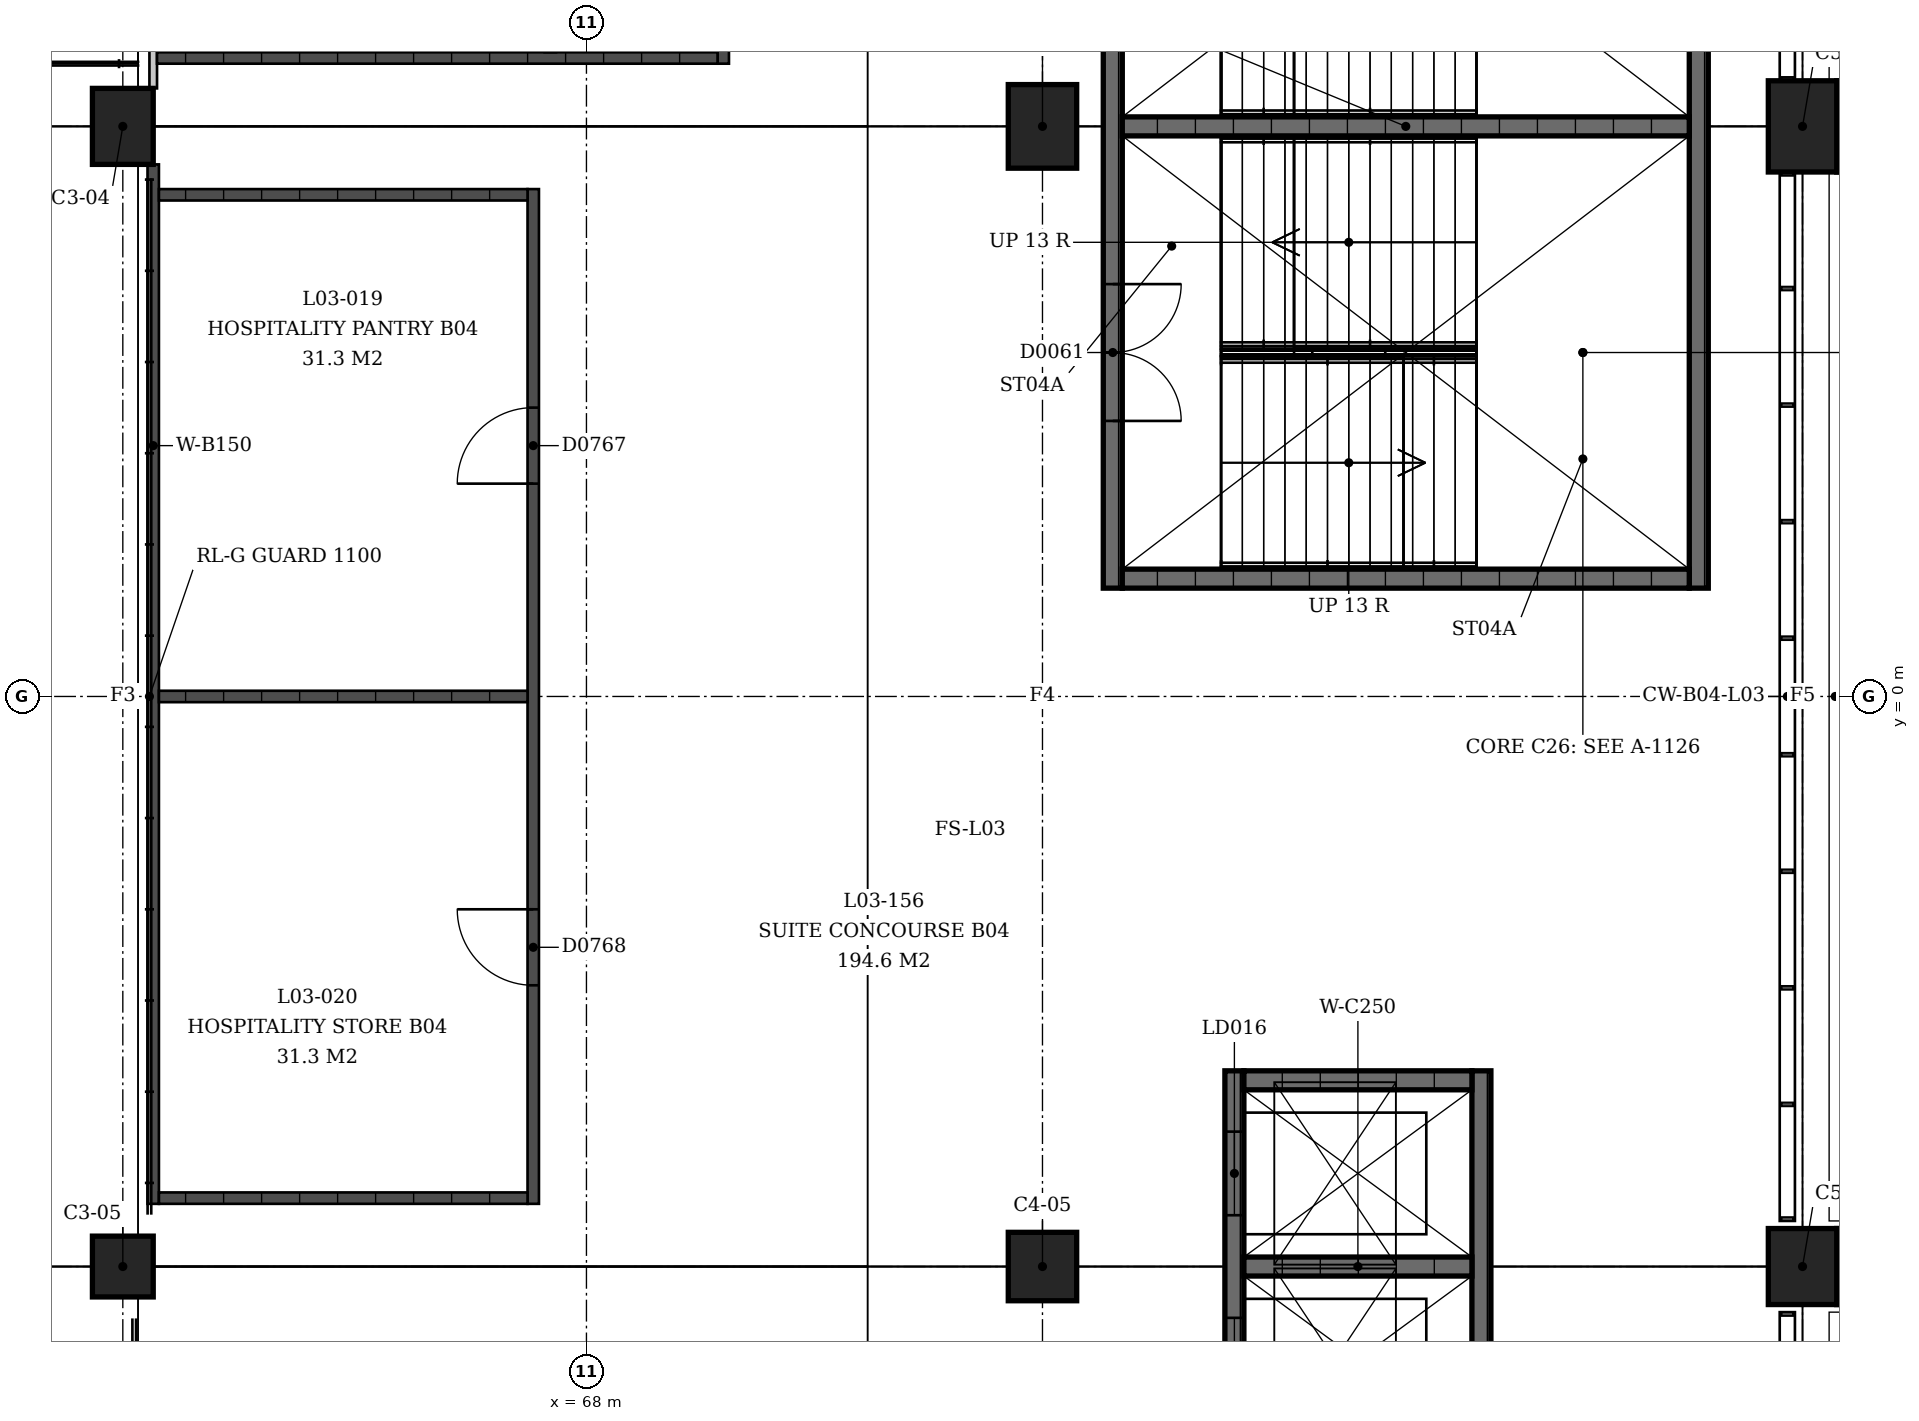
"""IFC4 building model, lengths in metres.
Left out: names, types, materials, properties, quantities, classifications, styles, units other than length and angle.
Written with IfcOpenShell. Run it as: python <this file> out.ifc"""

import sys

from ifc_helpers import new_model, si_unit, direction, frame, frame_2d, origin, origin_2d, place, context, subcontext, project, spatial, rectangle, extrude, element, fill, save


model = new_model("IFC4")
c1 = context("Model", 3, precision=1e-05, world=origin(), true_north=direction((0.0, 1.0)))
c2 = subcontext(c1, "Body", "Model", "MODEL_VIEW")
j1 = project(units=[si_unit("LENGTHUNIT", "METRE"), si_unit("PLANEANGLEUNIT", "RADIAN")], contexts=[c1])
p1 = place(None, origin())
s1 = spatial("IfcSite", under=j1, at=p1, CompositionType="ELEMENT")
p2 = place(p1, origin())
s2 = spatial("IfcBuilding", under=s1, at=p2, CompositionType="ELEMENT")
p3 = place(p2, frame((0.0, 0.0, 13.5)))
s3 = spatial("IfcBuildingStorey", under=s2, at=p3, CompositionType="ELEMENT", Elevation=13.5)
p4 = place(p3, frame((61.9, 7.5, 0.0), z_axis=(0.0, 0.0, 1.0), x_axis=(0.0, 1.0, 0.0)))
e1 = element("IfcColumn", 1, at=p4, inside=s3, PredefinedType="COLUMN", context=c2, shape_type="SweptSolid", body=[
    extrude(rectangle(XDim=1.0, YDim=0.8, at=origin_2d()), origin(), (0.0, 0.0, 1.0), 2.033),
])
p5 = place(p3, frame((74.0, 7.5, 0.0), z_axis=(0.0, 0.0, 1.0), x_axis=(0.0, 1.0, 0.0)))
e2 = element("IfcColumn", 2, at=p5, inside=s3, PredefinedType="COLUMN", context=c2, shape_type="SweptSolid", body=[
    extrude(rectangle(XDim=1.1, YDim=0.9, at=origin_2d()), origin(), (0.0, 0.0, 1.0), 4.5),
])
p6 = place(p3, frame((84.0, 7.5, 0.0), z_axis=(0.0, 0.0, 1.0), x_axis=(0.0, 1.0, 0.0)))
e3 = element("IfcColumn", 3, at=p6, inside=s3, PredefinedType="COLUMN", context=c2, shape_type="SweptSolid", body=[
    extrude(rectangle(XDim=1.2, YDim=0.9, at=origin_2d()), origin(), (0.0, 0.0, 1.0), 4.5),
])
p7 = place(p3, frame((61.9, -7.5, 0.0), z_axis=(0.0, 0.0, 1.0), x_axis=(0.0, 1.0, 0.0)))
e4 = element("IfcColumn", 4, at=p7, inside=s3, PredefinedType="COLUMN", context=c2, shape_type="SweptSolid", body=[
    extrude(rectangle(XDim=0.8, YDim=0.8, at=origin_2d()), origin(), (0.0, 0.0, 1.0), 2.033),
])
p8 = place(p3, frame((74.0, -7.5, 0.0), z_axis=(0.0, 0.0, 1.0), x_axis=(0.0, 1.0, 0.0)))
e5 = element("IfcColumn", 5, at=p8, inside=s3, PredefinedType="COLUMN", context=c2, shape_type="SweptSolid", body=[
    extrude(rectangle(XDim=0.9, YDim=0.9, at=origin_2d()), origin(), (0.0, 0.0, 1.0), 4.5),
])
p9 = place(p3, frame((84.0, -7.5, 0.0), z_axis=(0.0, 0.0, 1.0), x_axis=(0.0, 1.0, 0.0)))
e6 = element("IfcColumn", 6, at=p9, inside=s3, PredefinedType="COLUMN", context=c2, shape_type="SweptSolid", body=[
    extrude(rectangle(XDim=1.0, YDim=0.9, at=origin_2d()), origin(), (0.0, 0.0, 1.0), 4.5),
])
p10 = place(p3, frame((74.925, 1.425, 0.0), z_axis=(0.0, 0.0, 1.0), x_axis=(0.0, 1.0, 0.0)))
e7 = element("IfcWall", 7, at=p10, inside=s3, PredefinedType="SHEAR", context=c2, shape_type="SweptSolid", body=[
    extrude(rectangle(XDim=12.15, YDim=0.25, at=frame_2d((6.075, 0.0))), origin(), (0.0, 0.0, 1.0), 4.09),
])
p11 = place(p10, frame((2.2, 0.0, 0.0)))
e8 = element("IfcOpeningElement", 8, at=p11, cuts=e7, PredefinedType="OPENING", context=c2, shape_type="SweptSolid", body=[
    extrude(rectangle(XDim=1.8, YDim=2.1, at=frame_2d((0.9, 1.05))), frame((0.0, 0.125, 0.0), z_axis=(0.0, -1.0, 0.0), x_axis=(1.0, 0.0, 0.0)), (0.0, 0.0, 1.0), 0.25),
])
p12 = place(p10, frame((8.15, 0.0, 0.0)))
e9 = element("IfcOpeningElement", 9, at=p12, cuts=e7, PredefinedType="OPENING", context=c2, shape_type="SweptSolid", body=[
    extrude(rectangle(XDim=1.8, YDim=2.1, at=frame_2d((0.9, 1.05))), frame((0.0, 0.125, 0.0), z_axis=(0.0, -1.0, 0.0), x_axis=(1.0, 0.0, 0.0)), (0.0, 0.0, 1.0), 0.25),
])
p13 = place(p3, frame((82.635, 1.425, 0.0), z_axis=(0.0, 0.0, 1.0), x_axis=(0.0, 1.0, 0.0)))
e10 = element("IfcWall", 10, at=p13, inside=s3, PredefinedType="SHEAR", context=c2, shape_type="SweptSolid", body=[
    extrude(rectangle(XDim=12.15, YDim=0.25, at=frame_2d((6.075, 0.0))), origin(), (0.0, 0.0, 1.0), 4.09),
])
for number, where, z_axis, x_axis in (
    (11, (75.05, 1.55, 0.0), (0.0, 0.0, 1.0), (1.0, 0.0, 0.0)),
    (12, (75.05, 7.5, 0.0), (0.0, 0.0, 1.0), (1.0, 0.0, 0.0)),
):
    element("IfcWall", number, at=place(p3, frame(where, z_axis=z_axis, x_axis=x_axis)), inside=s3, PredefinedType="SHEAR", context=c2, shape_type="SweptSolid", body=[
        extrude(rectangle(XDim=7.46, YDim=0.25, at=frame_2d((3.73, 0.0))), origin(), (0.0, 0.0, 1.0), 4.09),
    ])
p14 = place(p3, frame((76.525, -10.075, 0.0), z_axis=(0.0, 0.0, 1.0), x_axis=(0.0, 1.0, 0.0)))
e13 = element("IfcWall", 13, at=p14, inside=s3, PredefinedType="SHEAR", context=c2, shape_type="SweptSolid", body=[
    extrude(rectangle(XDim=5.15, YDim=0.25, at=frame_2d((2.575, 0.0))), origin(), (0.0, 0.0, 1.0), 4.09),
])
p15 = place(p14, frame((0.8, 0.0, 0.0)))
e14 = element("IfcOpeningElement", 14, at=p15, cuts=e13, PredefinedType="OPENING", context=c2, shape_type="SweptSolid", body=[
    extrude(rectangle(XDim=1.1, YDim=2.1, at=frame_2d((0.55, 1.05))), frame((0.0, 0.125, 0.0), z_axis=(0.0, -1.0, 0.0), x_axis=(1.0, 0.0, 0.0)), (0.0, 0.0, 1.0), 0.25),
])
p16 = place(p14, frame((3.25, 0.0, 0.0)))
e15 = element("IfcOpeningElement", 15, at=p16, cuts=e13, PredefinedType="OPENING", context=c2, shape_type="SweptSolid", body=[
    extrude(rectangle(XDim=1.1, YDim=2.1, at=frame_2d((0.55, 1.05))), frame((0.0, 0.125, 0.0), z_axis=(0.0, -1.0, 0.0), x_axis=(1.0, 0.0, 0.0)), (0.0, 0.0, 1.0), 0.25),
])
p17 = place(p3, frame((79.775, -10.075, 0.0), z_axis=(0.0, 0.0, 1.0), x_axis=(0.0, 1.0, 0.0)))
e16 = element("IfcWall", 16, at=p17, inside=s3, PredefinedType="SHEAR", context=c2, shape_type="SweptSolid", body=[
    extrude(rectangle(XDim=5.15, YDim=0.25, at=frame_2d((2.575, 0.0))), origin(), (0.0, 0.0, 1.0), 4.09),
])
for number, where, z_axis, x_axis in (
    (17, (76.65, -5.05, 0.0), (0.0, 0.0, 1.0), (1.0, 0.0, 0.0)),
    (18, (76.65, -7.5, 0.0), (0.0, 0.0, 1.0), (1.0, 0.0, 0.0)),
):
    element("IfcWall", number, at=place(p3, frame(where, z_axis=z_axis, x_axis=x_axis)), inside=s3, PredefinedType="SHEAR", context=c2, shape_type="SweptSolid", body=[
        extrude(rectangle(XDim=3.0, YDim=0.25, at=frame_2d((1.5, 0.0))), origin(), (0.0, 0.0, 1.0), 4.09),
    ])
p18 = place(p3, frame((62.3, 8.0, 0.0), z_axis=(0.0, 0.0, 1.0), x_axis=(0.0, 1.0, 0.0)))
e19 = element("IfcWall", 19, at=p18, inside=s3, PredefinedType="PARTITIONING", context=c2, shape_type="SweptSolid", body=[
    extrude(rectangle(XDim=12.625, YDim=0.1, at=frame_2d((6.312, 0.0))), origin(), (0.0, 0.0, 1.0), 3.0),
])
p19 = place(p18, frame((2.538, 0.0, 0.0)))
e20 = element("IfcOpeningElement", 20, at=p19, cuts=e19, PredefinedType="OPENING", context=c2, shape_type="SweptSolid", body=[
    extrude(rectangle(XDim=1.8, YDim=2.1, at=frame_2d((0.9, 1.05))), frame((0.0, 0.05, 0.0), z_axis=(0.0, -1.0, 0.0), x_axis=(1.0, 0.0, 0.0)), (0.0, 0.0, 1.0), 0.1),
])
p20 = place(p18, frame((8.613, 0.0, 0.0)))
e21 = element("IfcOpeningElement", 21, at=p20, cuts=e19, PredefinedType="OPENING", context=c2, shape_type="SweptSolid", body=[
    extrude(rectangle(XDim=1.8, YDim=2.1, at=frame_2d((0.9, 1.05))), frame((0.0, 0.05, 0.0), z_axis=(0.0, -1.0, 0.0), x_axis=(1.0, 0.0, 0.0)), (0.0, 0.0, 1.0), 0.1),
])
p21 = place(p3, frame((69.8, 8.325, 0.0), z_axis=(0.0, 0.0, 1.0), x_axis=(0.0, 1.0, 0.0)))
e22 = element("IfcWall", 22, at=p21, inside=s3, PredefinedType="SOLIDWALL", context=c2, shape_type="SweptSolid", body=[
    extrude(rectangle(XDim=12.3, YDim=0.15, at=frame_2d((6.15, 0.0))), origin(), (0.0, 0.0, 1.0), 3.0),
])
p22 = place(p21, frame((3.916, 0.0, 0.0)))
e23 = element("IfcOpeningElement", 23, at=p22, cuts=e22, PredefinedType="OPENING", context=c2, shape_type="SweptSolid", body=[
    extrude(rectangle(XDim=1.0, YDim=2.1, at=frame_2d((0.5, 1.05))), frame((0.0, 0.075, 0.0), z_axis=(0.0, -1.0, 0.0), x_axis=(1.0, 0.0, 0.0)), (0.0, 0.0, 1.0), 0.15),
])
p23 = place(p21, frame((9.991, 0.0, 0.0)))
e24 = element("IfcOpeningElement", 24, at=p23, cuts=e22, PredefinedType="OPENING", context=c2, shape_type="SweptSolid", body=[
    extrude(rectangle(XDim=1.0, YDim=2.1, at=frame_2d((0.5, 1.05))), frame((0.0, 0.075, 0.0), z_axis=(0.0, -1.0, 0.0), x_axis=(1.0, 0.0, 0.0)), (0.0, 0.0, 1.0), 0.15),
])
p24 = place(p3, frame((62.35, 8.4, 0.0), z_axis=(0.0, 0.0, 1.0), x_axis=(1.0, 0.0, 0.0)))
e25 = element("IfcWall", 25, at=p24, inside=s3, PredefinedType="SOLIDWALL", context=c2, shape_type="SweptSolid", body=[
    extrude(rectangle(XDim=7.375, YDim=0.15, at=frame_2d((3.688, 0.0))), origin(), (0.0, 0.0, 1.0), 3.0),
])
p25 = place(p3, frame((67.525, 8.475, 0.0), z_axis=(0.0, 0.0, 1.0), x_axis=(0.0, 1.0, 0.0)))
e26 = element("IfcWall", 26, at=p25, inside=s3, PredefinedType="PARTITIONING", context=c2, shape_type="SweptSolid", body=[
    extrude(rectangle(XDim=1.775, YDim=0.15, at=frame_2d((0.887, 0.0))), origin(), (0.0, 0.0, 1.0), 3.0),
])
p26 = place(p25, frame((0.363, 0.0, 0.0)))
e27 = element("IfcOpeningElement", 27, at=p26, cuts=e26, PredefinedType="OPENING", context=c2, shape_type="SweptSolid", body=[
    extrude(rectangle(XDim=0.9, YDim=2.1, at=frame_2d((0.45, 1.05))), frame((0.0, 0.075, 0.0), z_axis=(0.0, -1.0, 0.0), x_axis=(1.0, 0.0, 0.0)), (0.0, 0.0, 1.0), 0.15),
])
p27 = place(p3, frame((62.3, 7.0, 0.0), z_axis=(0.0, 0.0, 1.0), x_axis=(0.0, -1.0, 0.0)))
e28 = element("IfcWall", 28, at=p27, inside=s3, PredefinedType="SOLIDWALL", context=c2, shape_type="SweptSolid", body=[
    extrude(rectangle(XDim=13.675, YDim=0.15, at=frame_2d((6.837, 0.0))), origin(), (0.0, 0.0, 1.0), 3.0),
])
p28 = place(p3, frame((67.3, 6.675, 0.0), z_axis=(0.0, 0.0, 1.0), x_axis=(0.0, -1.0, 0.0)))
e29 = element("IfcWall", 29, at=p28, inside=s3, PredefinedType="SOLIDWALL", context=c2, shape_type="SweptSolid", body=[
    extrude(rectangle(XDim=13.35, YDim=0.15, at=frame_2d((6.675, 0.0))), origin(), (0.0, 0.0, 1.0), 3.0),
])
p29 = place(p28, frame((2.875, 0.0, 0.0)))
e30 = element("IfcOpeningElement", 30, at=p29, cuts=e29, PredefinedType="OPENING", context=c2, shape_type="SweptSolid", body=[
    extrude(rectangle(XDim=1.0, YDim=2.1, at=frame_2d((0.5, 1.05))), frame((0.0, 0.075, 0.0), z_axis=(0.0, -1.0, 0.0), x_axis=(1.0, 0.0, 0.0)), (0.0, 0.0, 1.0), 0.15),
])
p30 = place(p28, frame((9.475, 0.0, 0.0)))
e31 = element("IfcOpeningElement", 31, at=p30, cuts=e29, PredefinedType="OPENING", context=c2, shape_type="SweptSolid", body=[
    extrude(rectangle(XDim=1.0, YDim=2.1, at=frame_2d((0.5, 1.05))), frame((0.0, 0.075, 0.0), z_axis=(0.0, -1.0, 0.0), x_axis=(1.0, 0.0, 0.0)), (0.0, 0.0, 1.0), 0.15),
])
for number, where, z_axis, x_axis in (
    (32, (62.375, 6.6, 0.0), (0.0, 0.0, 1.0), (1.0, 0.0, 0.0)),
    (33, (62.375, 0.0, 0.0), (0.0, 0.0, 1.0), (1.0, 0.0, 0.0)),
    (34, (62.375, -6.6, 0.0), (0.0, 0.0, 1.0), (1.0, 0.0, 0.0)),
):
    element("IfcWall", number, at=place(p3, frame(where, z_axis=z_axis, x_axis=x_axis)), inside=s3, PredefinedType="SOLIDWALL", context=c2, shape_type="SweptSolid", body=[
        extrude(rectangle(XDim=4.85, YDim=0.15, at=frame_2d((2.425, 0.0))), origin(), (0.0, 0.0, 1.0), 3.0),
    ])
p31 = place(p11, origin())
e35 = element("IfcDoor", 35, at=p31, inside=s3, OperationType="DOUBLE_DOOR_SINGLE_SWING", PredefinedType="DOOR", context=c2, shape_type="SweptSolid", body=[
    extrude(rectangle(XDim=1.8, YDim=2.1, at=frame_2d((0.9, 1.05))), frame((0.0, 0.025, 0.0), z_axis=(0.0, -1.0, 0.0), x_axis=(1.0, 0.0, 0.0)), (0.0, 0.0, 1.0), 0.05),
])
fill(e8, e35)
p32 = place(p15, origin())
e36 = element("IfcDoor", 36, at=p32, inside=s3, OperationType="SLIDING_TO_LEFT", PredefinedType="DOOR", context=c2, shape_type="SweptSolid", body=[
    extrude(rectangle(XDim=1.1, YDim=2.1, at=frame_2d((0.55, 1.05))), frame((0.0, 0.025, 0.0), z_axis=(0.0, -1.0, 0.0), x_axis=(1.0, 0.0, 0.0)), (0.0, 0.0, 1.0), 0.05),
])
fill(e14, e36)
p33 = place(p16, origin())
e37 = element("IfcDoor", 37, at=p33, inside=s3, OperationType="SLIDING_TO_LEFT", PredefinedType="DOOR", context=c2, shape_type="SweptSolid", body=[
    extrude(rectangle(XDim=1.1, YDim=2.1, at=frame_2d((0.55, 1.05))), frame((0.0, 0.025, 0.0), z_axis=(0.0, -1.0, 0.0), x_axis=(1.0, 0.0, 0.0)), (0.0, 0.0, 1.0), 0.05),
])
fill(e15, e37)
p34 = place(p29, origin())
e38 = element("IfcDoor", 38, at=p34, inside=s3, OperationType="SINGLE_SWING_RIGHT", PredefinedType="DOOR", context=c2, shape_type="SweptSolid", body=[
    extrude(rectangle(XDim=1.0, YDim=2.1, at=frame_2d((0.5, 1.05))), frame((0.0, 0.025, 0.0), z_axis=(0.0, -1.0, 0.0), x_axis=(1.0, 0.0, 0.0)), (0.0, 0.0, 1.0), 0.05),
])
fill(e30, e38)
p35 = place(p30, origin())
e39 = element("IfcDoor", 39, at=p35, inside=s3, OperationType="SINGLE_SWING_LEFT", PredefinedType="DOOR", context=c2, shape_type="SweptSolid", body=[
    extrude(rectangle(XDim=1.0, YDim=2.1, at=frame_2d((0.5, 1.05))), frame((0.0, 0.025, 0.0), z_axis=(0.0, -1.0, 0.0), x_axis=(1.0, 0.0, 0.0)), (0.0, 0.0, 1.0), 0.05),
])
fill(e31, e39)
save(model, sys.argv[1])
